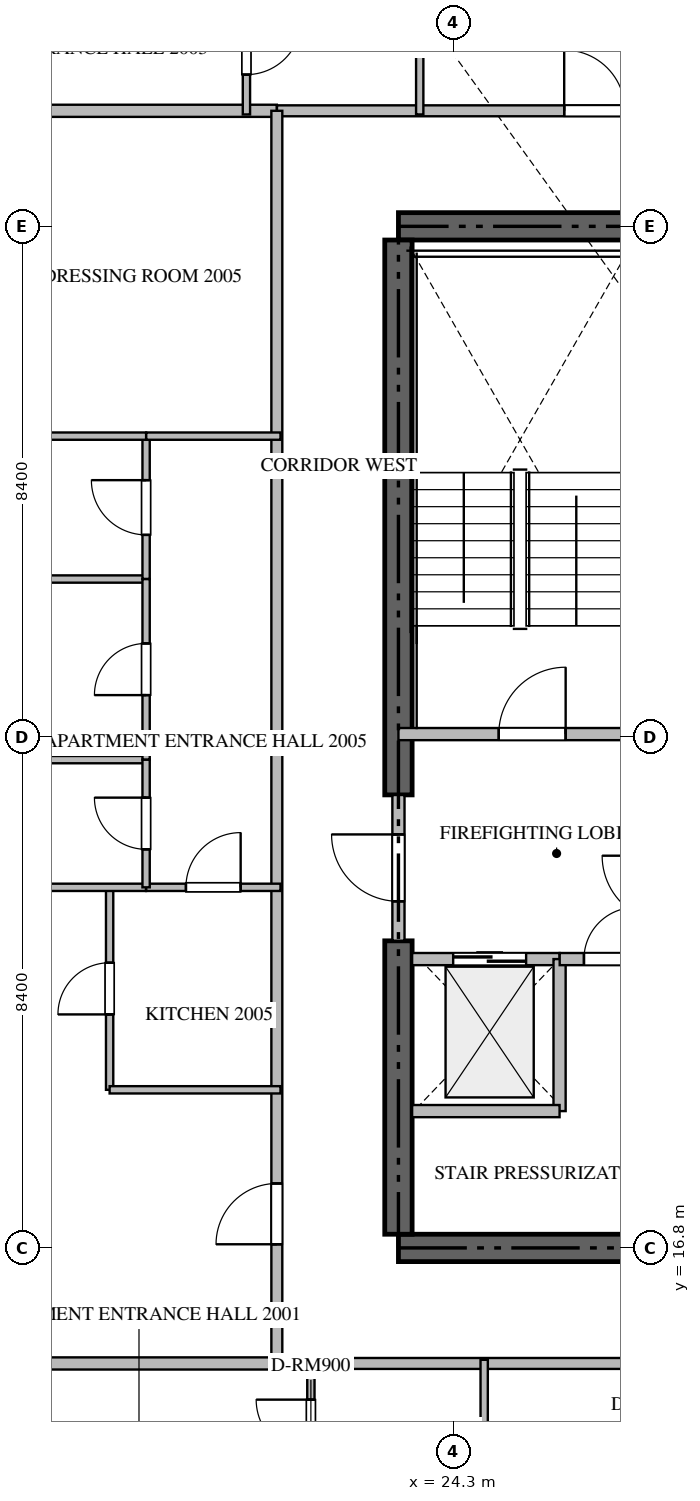
"""IFC4 building model, lengths in metres.
Left out: names, types, materials, properties, quantities, classifications, styles, units other than length and angle.
Written with IfcOpenShell. Run it as: python <this file> out.ifc"""

import sys

from ifc_helpers import new_model, si_unit, direction, frame, frame_2d, origin, place, context, subcontext, project, spatial, rectangle, extrude, source, transform, mapped, element, fill, save


model = new_model("IFC4")
c1 = context("Model", 3, precision=1e-05, world=origin(), true_north=direction((0.0, 1.0)))
c2 = subcontext(c1, "Body", "Model", "MODEL_VIEW")
j1 = project(units=[si_unit("LENGTHUNIT", "METRE"), si_unit("PLANEANGLEUNIT", "RADIAN")], contexts=[c1])
p1 = place(None, origin())
s1 = spatial("IfcSite", under=j1, at=p1, CompositionType="ELEMENT")
p2 = place(p1, origin())
s2 = spatial("IfcBuilding", under=s1, at=p2, CompositionType="ELEMENT")
p3 = place(p2, frame((0.0, 0.0, 82.95)))
s3 = spatial("IfcBuildingStorey", under=s2, at=p3, CompositionType="ELEMENT", Elevation=82.95)
for number, where, z_axis, x_axis in (
    (1, (23.4, 16.8, -0.26), (0.0, 0.0, 1.0), (1.0, 0.0, 0.0)),
    (2, (41.4, 33.6, -0.26), (0.0, 0.0, 1.0), (-1.0, 0.0, 0.0)),
):
    element("IfcWall", number, at=place(p3, frame(where, z_axis=z_axis, x_axis=x_axis)), inside=s3, PredefinedType="SHEAR", context=c2, shape_type="SweptSolid", body=[
        extrude(rectangle(XDim=18.0, YDim=0.45, at=frame_2d((9.0, 0.0))), origin(), (0.0, 0.0, 1.0), 3.748),
    ])
p4 = place(p3, frame((23.4, 17.025, -0.26), z_axis=(0.0, 0.0, 1.0), x_axis=(0.0, 1.0, 0.0)))
e3 = element("IfcWall", 3, at=p4, inside=s3, PredefinedType="SHEAR", context=c2, shape_type="SweptSolid", body=[
    extrude(rectangle(XDim=4.825, YDim=0.45, at=frame_2d((2.413, 0.0))), origin(), (0.0, 0.0, 1.0), 3.748),
])
p5 = place(p3, frame((23.4, 24.25, -0.26), z_axis=(0.0, 0.0, 1.0), x_axis=(0.0, 1.0, 0.0)))
e4 = element("IfcWall", 4, at=p5, inside=s3, PredefinedType="SHEAR", context=c2, shape_type="SweptSolid", body=[
    extrude(rectangle(XDim=9.125, YDim=0.45, at=frame_2d((4.562, 0.0))), origin(), (0.0, 0.0, 1.0), 3.748),
])
p6 = place(p3, frame((23.4, 25.25, 0.0), z_axis=(0.0, 0.0, 1.0), x_axis=(1.0, 0.0, 0.0)))
e5 = element("IfcWall", 5, at=p6, inside=s3, PredefinedType="STANDARD", context=c2, shape_type="SweptSolid", body=[
    extrude(rectangle(XDim=4.45, YDim=0.2, at=frame_2d((2.225, 0.0))), origin(), (0.0, 0.0, 1.0), 3.49),
])
p7 = place(p6, frame((1.65, 0.0, 0.0)))
e6 = element("IfcOpeningElement", 6, at=p7, cuts=e5, PredefinedType="OPENING", context=c2, shape_type="SweptSolid", body=[
    extrude(rectangle(XDim=1.1, YDim=2.15, at=frame_2d((0.55, 1.075))), frame((0.0, 0.11, 0.0), z_axis=(0.0, -1.0, 0.0), x_axis=(1.0, 0.0, 0.0)), (0.0, 0.0, 1.0), 0.22),
])
p8 = place(p3, frame((23.625, 21.55, 0.0), z_axis=(0.0, 0.0, 1.0), x_axis=(1.0, 0.0, 0.0)))
e7 = element("IfcWall", 7, at=p8, inside=s3, PredefinedType="STANDARD", context=c2, shape_type="SweptSolid", body=[
    extrude(rectangle(XDim=2.425, YDim=0.2, at=frame_2d((1.212, 0.0))), origin(), (0.0, 0.0, 1.0), 3.49),
])
p9 = place(p8, frame((0.675, 0.0, 0.0)))
e8 = element("IfcOpeningElement", 8, at=p9, cuts=e7, PredefinedType="OPENING", context=c2, shape_type="SweptSolid", body=[
    extrude(rectangle(XDim=1.2, YDim=2.2, at=frame_2d((0.6, 1.1))), frame((0.0, 0.11, 0.0), z_axis=(0.0, -1.0, 0.0), x_axis=(1.0, 0.0, 0.0)), (0.0, 0.0, 1.0), 0.22),
])
p10 = place(p3, frame((26.05, 19.05, 0.0), z_axis=(0.0, 0.0, 1.0), x_axis=(0.0, 1.0, 0.0)))
e9 = element("IfcWall", 9, at=p10, inside=s3, PredefinedType="STANDARD", context=c2, shape_type="SweptSolid", body=[
    extrude(rectangle(XDim=2.5, YDim=0.2, at=frame_2d((1.25, 0.0))), origin(), (0.0, 0.0, 1.0), 3.49),
])
p11 = place(p3, frame((23.625, 19.05, 0.0), z_axis=(0.0, 0.0, 1.0), x_axis=(1.0, 0.0, 0.0)))
e10 = element("IfcWall", 10, at=p11, inside=s3, PredefinedType="STANDARD", context=c2, shape_type="SweptSolid", body=[
    extrude(rectangle(XDim=2.425, YDim=0.2, at=frame_2d((1.212, 0.0))), origin(), (0.0, 0.0, 1.0), 3.49),
])
p12 = place(p3, frame((26.052, 21.55, 0.0), z_axis=(0.0, 0.0, 1.0), x_axis=(1.0, 0.0, 0.0)))
e11 = element("IfcWall", 11, at=p12, inside=s3, PredefinedType="STANDARD", context=c2, shape_type="SweptSolid", body=[
    extrude(rectangle(XDim=1.648, YDim=0.2, at=frame_2d((0.824, 0.0))), origin(), (0.0, 0.0, 1.0), 3.49),
])
p13 = place(p12, frame((0.399, 0.0, 0.0)))
e12 = element("IfcOpeningElement", 12, at=p13, cuts=e11, PredefinedType="OPENING", context=c2, shape_type="SweptSolid", body=[
    extrude(rectangle(XDim=0.85, YDim=2.1, at=frame_2d((0.425, 1.05))), frame((0.0, 0.11, 0.0), z_axis=(0.0, -1.0, 0.0), x_axis=(1.0, 0.0, 0.0)), (0.0, 0.0, 1.0), 0.22),
])
p14 = place(p3, frame((23.4, 21.852, 0.0), z_axis=(0.0, 0.0, 1.0), x_axis=(0.0, 1.0, 0.0)))
e13 = element("IfcWall", 13, at=p14, inside=s3, PredefinedType="STANDARD", context=c2, shape_type="SweptSolid", body=[
    extrude(rectangle(XDim=2.396, YDim=0.2, at=frame_2d((1.198, 0.0))), origin(), (0.0, 0.0, 1.0), 3.49),
])
p15 = place(p14, frame((0.648, 0.0, 0.0)))
e14 = element("IfcOpeningElement", 14, at=p15, cuts=e13, PredefinedType="OPENING", context=c2, shape_type="SweptSolid", body=[
    extrude(rectangle(XDim=1.1, YDim=2.15, at=frame_2d((0.55, 1.075))), frame((0.0, 0.11, 0.0), z_axis=(0.0, -1.0, 0.0), x_axis=(1.0, 0.0, 0.0)), (0.0, 0.0, 1.0), 0.22),
])
for number, where, z_axis, x_axis in (
    (15, (6.082, 14.9, 0.0), (0.0, 0.0, 1.0), (1.0, 0.0, 0.0)),
    (16, (6.082, 35.5, 0.0), (0.0, 0.0, 1.0), (1.0, 0.0, 0.0)),
):
    element("IfcWall", number, at=place(p3, frame(where, z_axis=z_axis, x_axis=x_axis)), inside=s3, PredefinedType="PARTITIONING", context=c2, shape_type="SweptSolid", body=[
        extrude(rectangle(XDim=15.318, YDim=0.2, at=frame_2d((7.659, 0.0))), origin(), (0.0, 0.0, 1.0), 3.49),
    ])
p16 = place(p3, frame((21.402, 14.9, 0.0), z_axis=(0.0, 0.0, 1.0), x_axis=(1.0, 0.0, 0.0)))
e17 = element("IfcWall", 17, at=p16, inside=s3, PredefinedType="PARTITIONING", context=c2, shape_type="SweptSolid", body=[
    extrude(rectangle(XDim=21.996, YDim=0.18, at=frame_2d((10.998, 0.0))), origin(), (0.0, 0.0, 1.0), 3.49),
])
p17 = place(p16, frame((5.774, 0.0, 0.0)))
e18 = element("IfcOpeningElement", 18, at=p17, cuts=e17, PredefinedType="OPENING", context=c2, shape_type="SweptSolid", body=[
    extrude(rectangle(XDim=1.0, YDim=2.15, at=frame_2d((0.5, 1.075))), frame((0.0, 0.1, 0.0), z_axis=(0.0, -1.0, 0.0), x_axis=(1.0, 0.0, 0.0)), (0.0, 0.0, 1.0), 0.2),
])
p18 = place(p16, frame((16.272, 0.0, 0.0)))
e19 = element("IfcOpeningElement", 19, at=p18, cuts=e17, PredefinedType="OPENING", context=c2, shape_type="SweptSolid", body=[
    extrude(rectangle(XDim=1.0, YDim=2.15, at=frame_2d((0.5, 1.075))), frame((0.0, 0.1, 0.0), z_axis=(0.0, -1.0, 0.0), x_axis=(1.0, 0.0, 0.0)), (0.0, 0.0, 1.0), 0.2),
])
p19 = place(p3, frame((21.402, 35.5, 0.0), z_axis=(0.0, 0.0, 1.0), x_axis=(1.0, 0.0, 0.0)))
e20 = element("IfcWall", 20, at=p19, inside=s3, PredefinedType="PARTITIONING", context=c2, shape_type="SweptSolid", body=[
    extrude(rectangle(XDim=21.996, YDim=0.18, at=frame_2d((10.998, 0.0))), origin(), (0.0, 0.0, 1.0), 3.49),
])
p20 = place(p19, frame((4.724, 0.0, 0.0)))
e21 = element("IfcOpeningElement", 21, at=p20, cuts=e20, PredefinedType="OPENING", context=c2, shape_type="SweptSolid", body=[
    extrude(rectangle(XDim=1.0, YDim=2.15, at=frame_2d((0.5, 1.075))), frame((0.0, 0.1, 0.0), z_axis=(0.0, -1.0, 0.0), x_axis=(1.0, 0.0, 0.0)), (0.0, 0.0, 1.0), 0.2),
])
p21 = place(p19, frame((18.77, 0.0, 0.0)))
e22 = element("IfcOpeningElement", 22, at=p21, cuts=e20, PredefinedType="OPENING", context=c2, shape_type="SweptSolid", body=[
    extrude(rectangle(XDim=1.0, YDim=2.15, at=frame_2d((0.5, 1.075))), frame((0.0, 0.1, 0.0), z_axis=(0.0, -1.0, 0.0), x_axis=(1.0, 0.0, 0.0)), (0.0, 0.0, 1.0), 0.2),
])
p22 = place(p3, frame((21.4, 14.9, 0.0), z_axis=(0.0, 0.0, 1.0), x_axis=(0.0, 1.0, 0.0)))
e23 = element("IfcWall", 23, at=p22, inside=s3, PredefinedType="PARTITIONING", context=c2, shape_type="SweptSolid", body=[
    extrude(rectangle(XDim=20.6, YDim=0.18, at=frame_2d((10.3, 0.0))), origin(), (0.0, 0.0, 1.0), 3.49),
])
p23 = place(p22, frame((1.96, 0.0, 0.0)))
e24 = element("IfcOpeningElement", 24, at=p23, cuts=e23, PredefinedType="OPENING", context=c2, shape_type="SweptSolid", body=[
    extrude(rectangle(XDim=1.0, YDim=2.15, at=frame_2d((0.5, 1.075))), frame((0.0, 0.1, 0.0), z_axis=(0.0, -1.0, 0.0), x_axis=(1.0, 0.0, 0.0)), (0.0, 0.0, 1.0), 0.2),
])
p24 = place(p3, frame((24.81, 12.15, 0.0), z_axis=(0.0, 0.0, 1.0), x_axis=(0.0, 1.0, 0.0)))
e25 = element("IfcWall", 25, at=p24, inside=s3, PredefinedType="PARTITIONING", context=c2, shape_type="SweptSolid", body=[
    extrude(rectangle(XDim=2.81, YDim=0.12, at=frame_2d((1.405, 0.0))), origin(), (0.0, 0.0, 1.0), 3.49),
])
p25 = place(p3, frame((21.96, 12.75, 0.0), z_axis=(0.0, 0.0, 1.0), x_axis=(0.0, 1.0, 0.0)))
e26 = element("IfcWall", 26, at=p25, inside=s3, PredefinedType="PARTITIONING", context=c2, shape_type="SweptSolid", body=[
    extrude(rectangle(XDim=2.21, YDim=0.12, at=frame_2d((1.105, 0.0))), origin(), (0.0, 0.0, 1.0), 3.49),
])
p26 = place(p25, frame((0.655, 0.0, 0.0)))
e27 = element("IfcOpeningElement", 27, at=p26, cuts=e26, PredefinedType="OPENING", context=c2, shape_type="SweptSolid", body=[
    extrude(rectangle(XDim=0.9, YDim=2.1, at=frame_2d((0.45, 1.05))), frame((0.0, 0.07, 0.0), z_axis=(0.0, -1.0, 0.0), x_axis=(1.0, 0.0, 0.0)), (0.0, 0.0, 1.0), 0.14),
])
p27 = place(p3, frame((23.75, 38.25, 0.0), z_axis=(0.0, 0.0, 1.0), x_axis=(0.0, -1.0, 0.0)))
e28 = element("IfcWall", 28, at=p27, inside=s3, PredefinedType="PARTITIONING", context=c2, shape_type="SweptSolid", body=[
    extrude(rectangle(XDim=2.81, YDim=0.12, at=frame_2d((1.405, 0.0))), origin(), (0.0, 0.0, 1.0), 3.49),
])
p28 = place(p3, frame((20.9, 37.65, 0.0), z_axis=(0.0, 0.0, 1.0), x_axis=(0.0, -1.0, 0.0)))
e29 = element("IfcWall", 29, at=p28, inside=s3, PredefinedType="PARTITIONING", context=c2, shape_type="SweptSolid", body=[
    extrude(rectangle(XDim=2.21, YDim=0.12, at=frame_2d((1.105, 0.0))), origin(), (0.0, 0.0, 1.0), 3.49),
])
p29 = place(p28, frame((0.655, 0.0, 0.0)))
e30 = element("IfcOpeningElement", 30, at=p29, cuts=e29, PredefinedType="OPENING", context=c2, shape_type="SweptSolid", body=[
    extrude(rectangle(XDim=0.9, YDim=2.1, at=frame_2d((0.45, 1.05))), frame((0.0, 0.07, 0.0), z_axis=(0.0, -1.0, 0.0), x_axis=(1.0, 0.0, 0.0)), (0.0, 0.0, 1.0), 0.14),
])
p30 = place(p3, frame((18.65, 19.4, 0.0), z_axis=(0.0, 0.0, 1.0), x_axis=(0.0, 1.0, 0.0)))
e31 = element("IfcWall", 31, at=p30, inside=s3, PredefinedType="PARTITIONING", context=c2, shape_type="SweptSolid", body=[
    extrude(rectangle(XDim=3.33, YDim=0.12, at=frame_2d((1.665, 0.0))), origin(), (0.0, 0.0, 1.0), 3.49),
])
p31 = place(p30, frame((1.24, 0.0, 0.0)))
e32 = element("IfcOpeningElement", 32, at=p31, cuts=e31, PredefinedType="OPENING", context=c2, shape_type="SweptSolid", body=[
    extrude(rectangle(XDim=0.85, YDim=2.1, at=frame_2d((0.425, 1.05))), frame((0.0, 0.07, 0.0), z_axis=(0.0, -1.0, 0.0), x_axis=(1.0, 0.0, 0.0)), (0.0, 0.0, 1.0), 0.14),
])
p32 = place(p3, frame((18.65, 19.4, 0.0), z_axis=(0.0, 0.0, 1.0), x_axis=(1.0, 0.0, 0.0)))
e33 = element("IfcWall", 33, at=p32, inside=s3, PredefinedType="PARTITIONING", context=c2, shape_type="SweptSolid", body=[
    extrude(rectangle(XDim=2.81, YDim=0.12, at=frame_2d((1.405, 0.0))), origin(), (0.0, 0.0, 1.0), 3.49),
])
p33 = place(p3, frame((19.25, 22.73, 0.0), z_axis=(0.0, 0.0, 1.0), x_axis=(1.0, 0.0, 0.0)))
e34 = element("IfcWall", 34, at=p33, inside=s3, PredefinedType="PARTITIONING", context=c2, shape_type="SweptSolid", body=[
    extrude(rectangle(XDim=2.21, YDim=0.12, at=frame_2d((1.105, 0.0))), origin(), (0.0, 0.0, 1.0), 3.49),
])
p34 = place(p33, frame((0.655, 0.0, 0.0)))
e35 = element("IfcOpeningElement", 35, at=p34, cuts=e34, PredefinedType="OPENING", context=c2, shape_type="SweptSolid", body=[
    extrude(rectangle(XDim=0.9, YDim=2.1, at=frame_2d((0.45, 1.05))), frame((0.0, 0.07, 0.0), z_axis=(0.0, -1.0, 0.0), x_axis=(1.0, 0.0, 0.0)), (0.0, 0.0, 1.0), 0.14),
])
p35 = place(p3, frame((10.262, 22.73, 0.0), z_axis=(0.0, 0.0, 1.0), x_axis=(1.0, 0.0, 0.0)))
e36 = element("IfcWall", 36, at=p35, inside=s3, PredefinedType="PARTITIONING", context=c2, shape_type="SweptSolid", body=[
    extrude(rectangle(XDim=8.986, YDim=0.12, at=frame_2d((4.493, 0.0))), origin(), (0.0, 0.0, 1.0), 3.49),
])
p36 = place(p3, frame((6.095, 27.8, 0.0), z_axis=(0.0, 0.0, 1.0), x_axis=(1.0, 0.0, 0.0)))
e37 = element("IfcWall", 37, at=p36, inside=s3, PredefinedType="PARTITIONING", context=c2, shape_type="SweptSolid", body=[
    extrude(rectangle(XDim=13.155, YDim=0.12, at=frame_2d((6.578, 0.0))), origin(), (0.0, 0.0, 1.0), 3.49),
])
p37 = place(p3, frame((10.26, 24.83, 0.0), z_axis=(0.0, 0.0, 1.0), x_axis=(1.0, 0.0, 0.0)))
e38 = element("IfcWall", 38, at=p37, inside=s3, PredefinedType="PARTITIONING", context=c2, shape_type="SweptSolid", body=[
    extrude(rectangle(XDim=8.99, YDim=0.12, at=frame_2d((4.495, 0.0))), origin(), (0.0, 0.0, 1.0), 3.49),
])
p38 = place(p3, frame((19.25, 22.73, 0.0), z_axis=(0.0, 0.0, 1.0), x_axis=(0.0, 1.0, 0.0)))
e39 = element("IfcWall", 39, at=p38, inside=s3, PredefinedType="PARTITIONING", context=c2, shape_type="SweptSolid", body=[
    extrude(rectangle(XDim=2.1, YDim=0.12, at=frame_2d((1.05, 0.0))), origin(), (0.0, 0.0, 1.0), 3.49),
])
p39 = place(p38, frame((0.625, 0.0, 0.0)))
e40 = element("IfcOpeningElement", 40, at=p39, cuts=e39, PredefinedType="OPENING", context=c2, shape_type="SweptSolid", body=[
    extrude(rectangle(XDim=0.85, YDim=2.1, at=frame_2d((0.425, 1.05))), frame((0.0, 0.07, 0.0), z_axis=(0.0, -1.0, 0.0), x_axis=(1.0, 0.0, 0.0)), (0.0, 0.0, 1.0), 0.14),
])
p40 = place(p3, frame((19.25, 24.832, 0.0), z_axis=(0.0, 0.0, 1.0), x_axis=(0.0, 1.0, 0.0)))
e41 = element("IfcWall", 41, at=p40, inside=s3, PredefinedType="PARTITIONING", context=c2, shape_type="SweptSolid", body=[
    extrude(rectangle(XDim=2.968, YDim=0.12, at=frame_2d((1.484, 0.0))), origin(), (0.0, 0.0, 1.0), 3.49),
])
p41 = place(p40, frame((1.059, 0.0, 0.0)))
e42 = element("IfcOpeningElement", 42, at=p41, cuts=e41, PredefinedType="OPENING", context=c2, shape_type="SweptSolid", body=[
    extrude(rectangle(XDim=0.85, YDim=2.1, at=frame_2d((0.425, 1.05))), frame((0.0, 0.07, 0.0), z_axis=(0.0, -1.0, 0.0), x_axis=(1.0, 0.0, 0.0)), (0.0, 0.0, 1.0), 0.14),
])
p42 = place(p3, frame((19.25, 27.802, 0.0), z_axis=(0.0, 0.0, 1.0), x_axis=(0.0, 1.0, 0.0)))
e43 = element("IfcWall", 43, at=p42, inside=s3, PredefinedType="PARTITIONING", context=c2, shape_type="SweptSolid", body=[
    extrude(rectangle(XDim=2.348, YDim=0.12, at=frame_2d((1.174, 0.0))), origin(), (0.0, 0.0, 1.0), 3.49),
])
p43 = place(p42, frame((0.724, 0.0, 0.0)))
e44 = element("IfcOpeningElement", 44, at=p43, cuts=e43, PredefinedType="OPENING", context=c2, shape_type="SweptSolid", body=[
    extrude(rectangle(XDim=0.9, YDim=2.1, at=frame_2d((0.45, 1.05))), frame((0.0, 0.07, 0.0), z_axis=(0.0, -1.0, 0.0), x_axis=(1.0, 0.0, 0.0)), (0.0, 0.0, 1.0), 0.14),
])
p44 = place(p3, frame((12.669, 30.15, 0.0), z_axis=(0.0, 0.0, 1.0), x_axis=(1.0, 0.0, 0.0)))
e45 = element("IfcWall", 45, at=p44, inside=s3, PredefinedType="PARTITIONING", context=c2, shape_type="SweptSolid", body=[
    extrude(rectangle(XDim=6.581, YDim=0.12, at=frame_2d((3.291, 0.0))), origin(), (0.0, 0.0, 1.0), 3.49),
])
p45 = place(p44, frame((2.865, 0.0, 0.0)))
e46 = element("IfcOpeningElement", 46, at=p45, cuts=e45, PredefinedType="OPENING", context=c2, shape_type="SweptSolid", body=[
    extrude(rectangle(XDim=0.85, YDim=2.1, at=frame_2d((0.425, 1.05))), frame((0.0, 0.07, 0.0), z_axis=(0.0, -1.0, 0.0), x_axis=(1.0, 0.0, 0.0)), (0.0, 0.0, 1.0), 0.14),
])
p46 = place(p3, frame((19.252, 30.15, 0.0), z_axis=(0.0, 0.0, 1.0), x_axis=(1.0, 0.0, 0.0)))
e47 = element("IfcWall", 47, at=p46, inside=s3, PredefinedType="PARTITIONING", context=c2, shape_type="SweptSolid", body=[
    extrude(rectangle(XDim=2.208, YDim=0.12, at=frame_2d((1.104, 0.0))), origin(), (0.0, 0.0, 1.0), 3.49),
])
m1 = source(origin(), c2, "Body", "SweptSolid", [
    extrude(rectangle(XDim=1.1, YDim=2.15, at=frame_2d((0.55, 1.075))), frame((0.0, 0.025, 0.0), z_axis=(0.0, -1.0, 0.0), x_axis=(1.0, 0.0, 0.0)), (0.0, 0.0, 1.0), 0.05),
])
p47 = place(p7, origin())
e48 = element("IfcDoor", 48, at=p47, inside=s3, OperationType="SINGLE_SWING_RIGHT", PredefinedType="DOOR", context=c2, shape_type="MappedRepresentation", body=[
    mapped(m1, transform((0.0, 0.0, 0.0), scale=1.0)),
])
fill(e6, e48)
m2 = source(origin(), c2, "Body", "SweptSolid", [
    extrude(rectangle(XDim=1.2, YDim=2.2, at=frame_2d((0.6, 1.1))), frame((0.0, 0.025, 0.0), z_axis=(0.0, -1.0, 0.0), x_axis=(1.0, 0.0, 0.0)), (0.0, 0.0, 1.0), 0.05),
])
p48 = place(p9, origin())
e49 = element("IfcDoor", 49, at=p48, inside=s3, OperationType="DOUBLE_DOOR_SLIDING", PredefinedType="DOOR", context=c2, shape_type="MappedRepresentation", body=[
    mapped(m2, transform((0.0, 0.0, 0.0), scale=1.0)),
])
fill(e8, e49)
m3 = source(origin(), c2, "Body", "SweptSolid", [
    extrude(rectangle(XDim=0.85, YDim=2.1, at=frame_2d((0.425, 1.05))), frame((0.0, 0.025, 0.0), z_axis=(0.0, -1.0, 0.0), x_axis=(1.0, 0.0, 0.0)), (0.0, 0.0, 1.0), 0.05),
])
p49 = place(p13, origin())
e50 = element("IfcDoor", 50, at=p49, inside=s3, OperationType="SINGLE_SWING_RIGHT", PredefinedType="DOOR", context=c2, shape_type="MappedRepresentation", body=[
    mapped(m3, transform((0.0, 0.0, 0.0), scale=1.0)),
])
fill(e12, e50)
p50 = place(p15, origin())
e51 = element("IfcDoor", 51, at=p50, inside=s3, OperationType="SINGLE_SWING_RIGHT", PredefinedType="DOOR", context=c2, shape_type="MappedRepresentation", body=[
    mapped(m1, transform((0.0, 0.0, 0.0), scale=1.0)),
])
fill(e14, e51)
m4 = source(origin(), c2, "Body", "SweptSolid", [
    extrude(rectangle(XDim=1.0, YDim=2.15, at=frame_2d((0.5, 1.075))), frame((0.0, 0.025, 0.0), z_axis=(0.0, -1.0, 0.0), x_axis=(1.0, 0.0, 0.0)), (0.0, 0.0, 1.0), 0.05),
])
p51 = place(p20, origin())
e52 = element("IfcDoor", 52, at=p51, inside=s3, OperationType="SINGLE_SWING_LEFT", PredefinedType="DOOR", context=c2, shape_type="MappedRepresentation", body=[
    mapped(m4, transform((0.0, 0.0, 0.0), scale=1.0)),
])
fill(e21, e52)
p52 = place(p23, origin())
e53 = element("IfcDoor", 53, at=p52, inside=s3, OperationType="SINGLE_SWING_LEFT", PredefinedType="DOOR", context=c2, shape_type="MappedRepresentation", body=[
    mapped(m4, transform((0.0, 0.0, 0.0), scale=1.0)),
])
fill(e24, e53)
m5 = source(origin(), c2, "Body", "SweptSolid", [
    extrude(rectangle(XDim=0.9, YDim=2.1, at=frame_2d((0.45, 1.05))), frame((0.0, 0.025, 0.0), z_axis=(0.0, -1.0, 0.0), x_axis=(1.0, 0.0, 0.0)), (0.0, 0.0, 1.0), 0.05),
])
p53 = place(p26, origin())
e54 = element("IfcDoor", 54, at=p53, inside=s3, OperationType="SINGLE_SWING_RIGHT", PredefinedType="DOOR", context=c2, shape_type="MappedRepresentation", body=[
    mapped(m5, transform((0.0, 0.0, 0.0), scale=1.0)),
])
fill(e27, e54)
p54 = place(p29, origin())
e55 = element("IfcDoor", 55, at=p54, inside=s3, OperationType="SINGLE_SWING_LEFT", PredefinedType="DOOR", context=c2, shape_type="MappedRepresentation", body=[
    mapped(m5, transform((0.0, 0.0, 0.0), scale=1.0)),
])
fill(e30, e55)
p55 = place(p31, origin())
e56 = element("IfcDoor", 56, at=p55, inside=s3, OperationType="SINGLE_SWING_LEFT", PredefinedType="DOOR", context=c2, shape_type="MappedRepresentation", body=[
    mapped(m3, transform((0.0, 0.0, 0.0), scale=1.0)),
])
fill(e32, e56)
p56 = place(p34, origin())
e57 = element("IfcDoor", 57, at=p56, inside=s3, OperationType="SINGLE_SWING_RIGHT", PredefinedType="DOOR", context=c2, shape_type="MappedRepresentation", body=[
    mapped(m5, transform((0.0, 0.0, 0.0), scale=1.0)),
])
fill(e35, e57)
p57 = place(p39, origin())
e58 = element("IfcDoor", 58, at=p57, inside=s3, OperationType="SINGLE_SWING_RIGHT", PredefinedType="DOOR", context=c2, shape_type="MappedRepresentation", body=[
    mapped(m3, transform((0.0, 0.0, 0.0), scale=1.0)),
])
fill(e40, e58)
p58 = place(p41, origin())
e59 = element("IfcDoor", 59, at=p58, inside=s3, OperationType="SINGLE_SWING_LEFT", PredefinedType="DOOR", context=c2, shape_type="MappedRepresentation", body=[
    mapped(m3, transform((0.0, 0.0, 0.0), scale=1.0)),
])
fill(e42, e59)
p59 = place(p43, origin())
e60 = element("IfcDoor", 60, at=p59, inside=s3, OperationType="SINGLE_SWING_RIGHT", PredefinedType="DOOR", context=c2, shape_type="MappedRepresentation", body=[
    mapped(m5, transform((0.0, 0.0, 0.0), scale=1.0)),
])
fill(e44, e60)
save(model, sys.argv[1])
